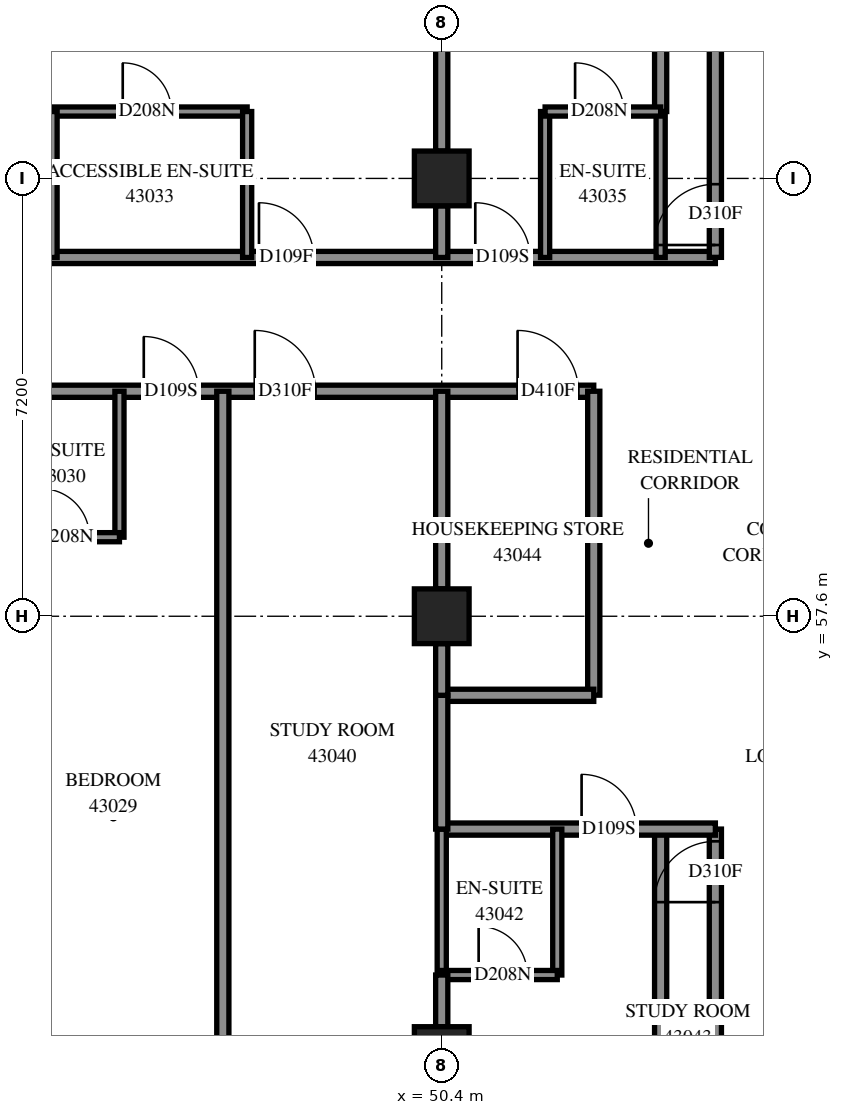
"""IFC4 building model, lengths in metres.
Left out: names, types, materials, properties, quantities, classifications, styles, units other than length and angle.
Written with IfcOpenShell. Run it as: python <this file> out.ifc"""

import sys

from ifc_helpers import new_model, si_unit, direction, frame, frame_2d, origin, origin_2d, place, context, subcontext, project, spatial, rectangle, extrude, element, fill, save


model = new_model("IFC4")
c1 = context("Model", 3, precision=1e-05, world=origin(), true_north=direction((0.0, 1.0)))
c2 = subcontext(c1, "Body", "Model", "MODEL_VIEW")
j1 = project(units=[si_unit("LENGTHUNIT", "METRE"), si_unit("PLANEANGLEUNIT", "RADIAN")], contexts=[c1])
p1 = place(None, origin())
s1 = spatial("IfcSite", under=j1, at=p1, CompositionType="ELEMENT")
p2 = place(p1, origin())
s2 = spatial("IfcBuilding", under=s1, at=p2, CompositionType="ELEMENT")
p3 = place(p2, frame((0.0, 0.0, 159.2)))
s3 = spatial("IfcBuildingStorey", under=s2, at=p3, CompositionType="ELEMENT", Elevation=159.2)
for number, where, z_axis, x_axis in (
    (1, (50.4, 50.4, 0.0), (0.0, 0.0, 1.0), (1.0, 0.0, 0.0)),
    (2, (50.4, 57.6, 0.0), (0.0, 0.0, 1.0), (1.0, 0.0, 0.0)),
    (3, (50.4, 64.8, 0.0), (0.0, 0.0, 1.0), (1.0, 0.0, 0.0)),
):
    element("IfcColumn", number, at=place(p3, frame(where, z_axis=z_axis, x_axis=x_axis)), inside=s3, PredefinedType="COLUMN", context=c2, shape_type="SweptSolid", body=[
        extrude(rectangle(XDim=0.9, YDim=0.9, at=origin_2d()), origin(), (0.0, 0.0, 1.0), 3.1),
    ])
p4 = place(p3, frame((36.0, 61.3, 0.0), z_axis=(0.0, 0.0, 1.0), x_axis=(1.0, 0.0, 0.0)))
e4 = element("IfcWall", 4, at=p4, inside=s3, PredefinedType="PARTITIONING", context=c2, shape_type="SweptSolid", body=[
    extrude(rectangle(XDim=16.9, YDim=0.2, at=frame_2d((8.45, 0.0))), origin(), (0.0, 0.0, 1.0), 3.1),
])
p5 = place(p4, frame((2.3, 0.0, 0.0)))
e5 = element("IfcOpeningElement", 5, at=p5, cuts=e4, PredefinedType="OPENING", context=c2, shape_type="SweptSolid", body=[
    extrude(rectangle(XDim=0.9, YDim=2.1, at=frame_2d((0.45, 1.05))), frame((0.0, 0.11, 0.0), z_axis=(0.0, -1.0, 0.0), x_axis=(1.0, 0.0, 0.0)), (0.0, 0.0, 1.0), 0.22),
])
p6 = place(p4, frame((4.125, 0.0, 0.0)))
e6 = element("IfcOpeningElement", 6, at=p6, cuts=e4, PredefinedType="OPENING", context=c2, shape_type="SweptSolid", body=[
    extrude(rectangle(XDim=1.0, YDim=2.1, at=frame_2d((0.5, 1.05))), frame((0.0, 0.11, 0.0), z_axis=(0.0, -1.0, 0.0), x_axis=(1.0, 0.0, 0.0)), (0.0, 0.0, 1.0), 0.22),
])
p7 = place(p4, frame((9.5, 0.0, 0.0)))
e7 = element("IfcOpeningElement", 7, at=p7, cuts=e4, PredefinedType="OPENING", context=c2, shape_type="SweptSolid", body=[
    extrude(rectangle(XDim=0.9, YDim=2.1, at=frame_2d((0.45, 1.05))), frame((0.0, 0.11, 0.0), z_axis=(0.0, -1.0, 0.0), x_axis=(1.0, 0.0, 0.0)), (0.0, 0.0, 1.0), 0.22),
])
p8 = place(p4, frame((11.325, 0.0, 0.0)))
e8 = element("IfcOpeningElement", 8, at=p8, cuts=e4, PredefinedType="OPENING", context=c2, shape_type="SweptSolid", body=[
    extrude(rectangle(XDim=1.0, YDim=2.1, at=frame_2d((0.5, 1.05))), frame((0.0, 0.11, 0.0), z_axis=(0.0, -1.0, 0.0), x_axis=(1.0, 0.0, 0.0)), (0.0, 0.0, 1.0), 0.22),
])
p9 = place(p4, frame((15.647, 0.0, 0.0)))
e9 = element("IfcOpeningElement", 9, at=p9, cuts=e4, PredefinedType="OPENING", context=c2, shape_type="SweptSolid", body=[
    extrude(rectangle(XDim=1.0, YDim=2.1, at=frame_2d((0.5, 1.05))), frame((0.0, 0.11, 0.0), z_axis=(0.0, -1.0, 0.0), x_axis=(1.0, 0.0, 0.0)), (0.0, 0.0, 1.0), 0.22),
])
p10 = place(p3, frame((40.702, 63.5, 0.0), z_axis=(0.0, 0.0, 1.0), x_axis=(1.0, 0.0, 0.0)))
e10 = element("IfcWall", 10, at=p10, inside=s3, PredefinedType="PARTITIONING", context=c2, shape_type="SweptSolid", body=[
    extrude(rectangle(XDim=14.198, YDim=0.2, at=frame_2d((7.099, 0.0))), origin(), (0.0, 0.0, 1.0), 3.1),
])
p11 = place(p10, frame((6.692, 0.0, 0.0)))
e11 = element("IfcOpeningElement", 11, at=p11, cuts=e10, PredefinedType="OPENING", context=c2, shape_type="SweptSolid", body=[
    extrude(rectangle(XDim=0.9, YDim=2.1, at=frame_2d((0.45, 1.05))), frame((0.0, 0.11, 0.0), z_axis=(0.0, -1.0, 0.0), x_axis=(1.0, 0.0, 0.0)), (0.0, 0.0, 1.0), 0.22),
])
p12 = place(p10, frame((10.25, 0.0, 0.0)))
e12 = element("IfcOpeningElement", 12, at=p12, cuts=e10, PredefinedType="OPENING", context=c2, shape_type="SweptSolid", body=[
    extrude(rectangle(XDim=0.9, YDim=2.1, at=frame_2d((0.45, 1.05))), frame((0.0, 0.11, 0.0), z_axis=(0.0, -1.0, 0.0), x_axis=(1.0, 0.0, 0.0)), (0.0, 0.0, 1.0), 0.22),
])
p13 = place(p3, frame((54.0, 42.297, 0.0), z_axis=(0.0, 0.0, 1.0), x_axis=(0.0, 1.0, 0.0)))
e13 = element("IfcWall", 13, at=p13, inside=s3, PredefinedType="PARTITIONING", context=c2, shape_type="SweptSolid", body=[
    extrude(rectangle(XDim=11.803, YDim=0.2, at=frame_2d((5.901, 0.0))), origin(), (0.0, 0.0, 1.0), 3.1),
])
p14 = place(p3, frame((46.8, 49.7, 0.0), z_axis=(0.0, 0.0, 1.0), x_axis=(0.0, 1.0, 0.0)))
e14 = element("IfcWall", 14, at=p14, inside=s3, PredefinedType="PARTITIONING", context=c2, shape_type="SweptSolid", body=[
    extrude(rectangle(XDim=11.6, YDim=0.2, at=frame_2d((5.8, 0.0))), origin(), (0.0, 0.0, 1.0), 3.1),
])
p15 = place(p3, frame((54.0, 65.9, 0.0), z_axis=(0.0, 0.0, 1.0), x_axis=(0.0, 1.0, 0.0)))
e15 = element("IfcWall", 15, at=p15, inside=s3, PredefinedType="PARTITIONING", context=c2, shape_type="SweptSolid", body=[
    extrude(rectangle(XDim=6.859, YDim=0.2, at=frame_2d((3.429, 0.0))), origin(), (0.0, 0.0, 1.0), 3.1),
])
p16 = place(p3, frame((54.9, 47.7, 0.0), z_axis=(0.0, 0.0, 1.0), x_axis=(0.0, 1.0, 0.0)))
e16 = element("IfcWall", 16, at=p16, inside=s3, PredefinedType="PARTITIONING", context=c2, shape_type="SweptSolid", body=[
    extrude(rectangle(XDim=6.4, YDim=0.2, at=frame_2d((3.2, 0.0))), origin(), (0.0, 0.0, 1.0), 3.1),
])
p17 = place(p16, frame((5.199, 0.0, 0.0)))
e17 = element("IfcOpeningElement", 17, at=p17, cuts=e16, PredefinedType="OPENING", context=c2, shape_type="SweptSolid", body=[
    extrude(rectangle(XDim=1.0, YDim=2.1, at=frame_2d((0.5, 1.05))), frame((0.0, 0.11, 0.0), z_axis=(0.0, -1.0, 0.0), x_axis=(1.0, 0.0, 0.0)), (0.0, 0.0, 1.0), 0.22),
])
p18 = place(p3, frame((50.4, 65.25, 0.0), z_axis=(0.0, 0.0, 1.0), x_axis=(0.0, 1.0, 0.0)))
e18 = element("IfcWall", 18, at=p18, inside=s3, PredefinedType="PARTITIONING", context=c2, shape_type="SweptSolid", body=[
    extrude(rectangle(XDim=6.3, YDim=0.2, at=frame_2d((3.15, 0.0))), origin(), (0.0, 0.0, 1.0), 3.1),
])
p19 = place(p3, frame((52.9, 56.302, 0.0), z_axis=(0.0, 0.0, 1.0), x_axis=(0.0, 1.0, 0.0)))
e19 = element("IfcWall", 19, at=p19, inside=s3, PredefinedType="PARTITIONING", context=c2, shape_type="SweptSolid", body=[
    extrude(rectangle(XDim=4.998, YDim=0.2, at=frame_2d((2.499, 0.0))), origin(), (0.0, 0.0, 1.0), 3.1),
])
p20 = place(p3, frame((50.4, 54.1, 0.0), z_axis=(0.0, 0.0, 1.0), x_axis=(1.0, 0.0, 0.0)))
e20 = element("IfcWall", 20, at=p20, inside=s3, PredefinedType="PARTITIONING", context=c2, shape_type="SweptSolid", body=[
    extrude(rectangle(XDim=4.5, YDim=0.2, at=frame_2d((2.25, 0.0))), origin(), (0.0, 0.0, 1.0), 3.1),
])
p21 = place(p20, frame((2.3, 0.0, 0.0)))
e21 = element("IfcOpeningElement", 21, at=p21, cuts=e20, PredefinedType="OPENING", context=c2, shape_type="SweptSolid", body=[
    extrude(rectangle(XDim=0.9, YDim=2.1, at=frame_2d((0.45, 1.05))), frame((0.0, 0.11, 0.0), z_axis=(0.0, -1.0, 0.0), x_axis=(1.0, 0.0, 0.0)), (0.0, 0.0, 1.0), 0.22),
])
p22 = place(p3, frame((54.9, 63.502, 0.0), z_axis=(0.0, 0.0, 1.0), x_axis=(0.0, 1.0, 0.0)))
e22 = element("IfcWall", 22, at=p22, inside=s3, PredefinedType="PARTITIONING", context=c2, shape_type="SweptSolid", body=[
    extrude(rectangle(XDim=3.998, YDim=0.2, at=frame_2d((1.999, 0.0))), origin(), (0.0, 0.0, 1.0), 3.1),
])
p23 = place(p22, frame((0.203, 0.0, 0.0)))
e23 = element("IfcOpeningElement", 23, at=p23, cuts=e22, PredefinedType="OPENING", context=c2, shape_type="SweptSolid", body=[
    extrude(rectangle(XDim=1.0, YDim=2.1, at=frame_2d((0.5, 1.05))), frame((0.0, 0.11, 0.0), z_axis=(0.0, -1.0, 0.0), x_axis=(1.0, 0.0, 0.0)), (0.0, 0.0, 1.0), 0.22),
])
p24 = place(p3, frame((50.4, 58.05, 0.0), z_axis=(0.0, 0.0, 1.0), x_axis=(0.0, 1.0, 0.0)))
e24 = element("IfcWall", 24, at=p24, inside=s3, PredefinedType="PARTITIONING", context=c2, shape_type="SweptSolid", body=[
    extrude(rectangle(XDim=3.25, YDim=0.2, at=frame_2d((1.625, 0.0))), origin(), (0.0, 0.0, 1.0), 3.1),
])
p25 = place(p3, frame((44.0, 65.9, 0.0), z_axis=(0.0, 0.0, 1.0), x_axis=(1.0, 0.0, 0.0)))
e25 = element("IfcWall", 25, at=p25, inside=s3, PredefinedType="PARTITIONING", context=c2, shape_type="SweptSolid", body=[
    extrude(rectangle(XDim=3.2, YDim=0.15, at=frame_2d((1.6, 0.0))), origin(), (0.0, 0.0, 1.0), 3.1),
])
p26 = place(p25, frame((1.154, 0.0, 0.0)))
e26 = element("IfcOpeningElement", 26, at=p26, cuts=e25, PredefinedType="OPENING", context=c2, shape_type="SweptSolid", body=[
    extrude(rectangle(XDim=0.8, YDim=2.1, at=frame_2d((0.4, 1.05))), frame((0.0, 0.085, 0.0), z_axis=(0.0, -1.0, 0.0), x_axis=(1.0, 0.0, 0.0)), (0.0, 0.0, 1.0), 0.17),
])
p27 = place(p3, frame((50.4, 56.3, 0.0), z_axis=(0.0, 0.0, 1.0), x_axis=(1.0, 0.0, 0.0)))
e27 = element("IfcWall", 27, at=p27, inside=s3, PredefinedType="PARTITIONING", context=c2, shape_type="SweptSolid", body=[
    extrude(rectangle(XDim=2.5, YDim=0.2, at=frame_2d((1.25, 0.0))), origin(), (0.0, 0.0, 1.0), 3.1),
])
for number, where, z_axis, x_axis in (
    (28, (44.0, 63.5, 0.0), (0.0, 0.0, 1.0), (0.0, 1.0, 0.0)),
    (29, (47.2, 63.5, 0.0), (0.0, 0.0, 1.0), (0.0, 1.0, 0.0)),
    (30, (52.1, 63.5, 0.0), (0.0, 0.0, 1.0), (0.0, 1.0, 0.0)),
    (31, (54.0, 63.5, 0.0), (0.0, 0.0, 1.0), (0.0, 1.0, 0.0)),
    (32, (45.1, 58.9, 0.0), (0.0, 0.0, 1.0), (0.0, 1.0, 0.0)),
    (33, (52.3, 51.7, 0.0), (0.0, 0.0, 1.0), (0.0, 1.0, 0.0)),
    (34, (50.4, 51.7, 0.0), (0.0, 0.0, 1.0), (0.0, 1.0, 0.0)),
):
    element("IfcWall", number, at=place(p3, frame(where, z_axis=z_axis, x_axis=x_axis)), inside=s3, PredefinedType="PARTITIONING", context=c2, shape_type="SweptSolid", body=[
        extrude(rectangle(XDim=2.4, YDim=0.15, at=frame_2d((1.2, 0.0))), origin(), (0.0, 0.0, 1.0), 3.1),
    ])
p28 = place(p3, frame((50.4, 54.1, 0.0), z_axis=(0.0, 0.0, 1.0), x_axis=(0.0, 1.0, 0.0)))
e35 = element("IfcWall", 35, at=p28, inside=s3, PredefinedType="PARTITIONING", context=c2, shape_type="SweptSolid", body=[
    extrude(rectangle(XDim=2.2, YDim=0.2, at=frame_2d((1.1, 0.0))), origin(), (0.0, 0.0, 1.0), 3.1),
])
p29 = place(p3, frame((43.2, 58.9, 0.0), z_axis=(0.0, 0.0, 1.0), x_axis=(1.0, 0.0, 0.0)))
e36 = element("IfcWall", 36, at=p29, inside=s3, PredefinedType="PARTITIONING", context=c2, shape_type="SweptSolid", body=[
    extrude(rectangle(XDim=1.9, YDim=0.15, at=frame_2d((0.95, 0.0))), origin(), (0.0, 0.0, 1.0), 3.1),
])
p30 = place(p29, frame((0.607, 0.0, 0.0)))
e37 = element("IfcOpeningElement", 37, at=p30, cuts=e36, PredefinedType="OPENING", context=c2, shape_type="SweptSolid", body=[
    extrude(rectangle(XDim=0.8, YDim=2.1, at=frame_2d((0.4, 1.05))), frame((0.0, 0.085, 0.0), z_axis=(0.0, -1.0, 0.0), x_axis=(1.0, 0.0, 0.0)), (0.0, 0.0, 1.0), 0.17),
])
p31 = place(p3, frame((52.1, 65.9, 0.0), z_axis=(0.0, 0.0, 1.0), x_axis=(1.0, 0.0, 0.0)))
e38 = element("IfcWall", 38, at=p31, inside=s3, PredefinedType="PARTITIONING", context=c2, shape_type="SweptSolid", body=[
    extrude(rectangle(XDim=1.9, YDim=0.15, at=frame_2d((0.95, 0.0))), origin(), (0.0, 0.0, 1.0), 3.1),
])
p32 = place(p31, frame((0.493, 0.0, 0.0)))
e39 = element("IfcOpeningElement", 39, at=p32, cuts=e38, PredefinedType="OPENING", context=c2, shape_type="SweptSolid", body=[
    extrude(rectangle(XDim=0.8, YDim=2.1, at=frame_2d((0.4, 1.05))), frame((0.0, 0.085, 0.0), z_axis=(0.0, -1.0, 0.0), x_axis=(1.0, 0.0, 0.0)), (0.0, 0.0, 1.0), 0.17),
])
p33 = place(p3, frame((50.4, 51.7, 0.0), z_axis=(0.0, 0.0, 1.0), x_axis=(1.0, 0.0, 0.0)))
e40 = element("IfcWall", 40, at=p33, inside=s3, PredefinedType="PARTITIONING", context=c2, shape_type="SweptSolid", body=[
    extrude(rectangle(XDim=1.9, YDim=0.15, at=frame_2d((0.95, 0.0))), origin(), (0.0, 0.0, 1.0), 3.1),
])
p34 = place(p33, frame((0.607, 0.0, 0.0)))
e41 = element("IfcOpeningElement", 41, at=p34, cuts=e40, PredefinedType="OPENING", context=c2, shape_type="SweptSolid", body=[
    extrude(rectangle(XDim=0.8, YDim=2.1, at=frame_2d((0.4, 1.05))), frame((0.0, 0.085, 0.0), z_axis=(0.0, -1.0, 0.0), x_axis=(1.0, 0.0, 0.0)), (0.0, 0.0, 1.0), 0.17),
])
for number, where, z_axis, x_axis in (
    (42, (50.4, 50.85, 0.0), (0.0, 0.0, 1.0), (0.0, 1.0, 0.0)),
    (43, (50.4, 56.3, 0.0), (0.0, 0.0, 1.0), (0.0, 1.0, 0.0)),
    (44, (50.4, 63.5, 0.0), (0.0, 0.0, 1.0), (0.0, 1.0, 0.0)),
):
    element("IfcWall", number, at=place(p3, frame(where, z_axis=z_axis, x_axis=x_axis)), inside=s3, PredefinedType="PARTITIONING", context=c2, shape_type="SweptSolid", body=[
        extrude(rectangle(XDim=0.85, YDim=0.2, at=frame_2d((0.425, 0.0))), origin(), (0.0, 0.0, 1.0), 3.1),
    ])
p35 = place(p7, origin())
e45 = element("IfcDoor", 45, at=p35, inside=s3, OperationType="SINGLE_SWING_LEFT", PredefinedType="DOOR", context=c2, shape_type="SweptSolid", body=[
    extrude(rectangle(XDim=0.9, YDim=2.1, at=frame_2d((0.45, 1.05))), frame((0.0, 0.025, 0.0), z_axis=(0.0, -1.0, 0.0), x_axis=(1.0, 0.0, 0.0)), (0.0, 0.0, 1.0), 0.05),
])
fill(e7, e45)
p36 = place(p30, origin())
e46 = element("IfcDoor", 46, at=p36, inside=s3, OperationType="SINGLE_SWING_RIGHT", PredefinedType="DOOR", context=c2, shape_type="SweptSolid", body=[
    extrude(rectangle(XDim=0.8, YDim=2.1, at=frame_2d((0.4, 1.05))), frame((0.0, 0.025, 0.0), z_axis=(0.0, -1.0, 0.0), x_axis=(1.0, 0.0, 0.0)), (0.0, 0.0, 1.0), 0.05),
])
fill(e37, e46)
p37 = place(p11, origin())
e47 = element("IfcDoor", 47, at=p37, inside=s3, OperationType="SINGLE_SWING_RIGHT", PredefinedType="DOOR", context=c2, shape_type="SweptSolid", body=[
    extrude(rectangle(XDim=0.9, YDim=2.1, at=frame_2d((0.45, 1.05))), frame((0.0, 0.025, 0.0), z_axis=(0.0, -1.0, 0.0), x_axis=(1.0, 0.0, 0.0)), (0.0, 0.0, 1.0), 0.05),
])
fill(e11, e47)
p38 = place(p26, origin())
e48 = element("IfcDoor", 48, at=p38, inside=s3, OperationType="SINGLE_SWING_RIGHT", PredefinedType="DOOR", context=c2, shape_type="SweptSolid", body=[
    extrude(rectangle(XDim=0.8, YDim=2.1, at=frame_2d((0.4, 1.05))), frame((0.0, 0.025, 0.0), z_axis=(0.0, -1.0, 0.0), x_axis=(1.0, 0.0, 0.0)), (0.0, 0.0, 1.0), 0.05),
])
fill(e26, e48)
p39 = place(p12, origin())
e49 = element("IfcDoor", 49, at=p39, inside=s3, OperationType="SINGLE_SWING_RIGHT", PredefinedType="DOOR", context=c2, shape_type="SweptSolid", body=[
    extrude(rectangle(XDim=0.9, YDim=2.1, at=frame_2d((0.45, 1.05))), frame((0.0, 0.025, 0.0), z_axis=(0.0, -1.0, 0.0), x_axis=(1.0, 0.0, 0.0)), (0.0, 0.0, 1.0), 0.05),
])
fill(e12, e49)
p40 = place(p32, origin())
e50 = element("IfcDoor", 50, at=p40, inside=s3, OperationType="SINGLE_SWING_RIGHT", PredefinedType="DOOR", context=c2, shape_type="SweptSolid", body=[
    extrude(rectangle(XDim=0.8, YDim=2.1, at=frame_2d((0.4, 1.05))), frame((0.0, 0.025, 0.0), z_axis=(0.0, -1.0, 0.0), x_axis=(1.0, 0.0, 0.0)), (0.0, 0.0, 1.0), 0.05),
])
fill(e39, e50)
p41 = place(p23, origin())
e51 = element("IfcDoor", 51, at=p41, inside=s3, OperationType="SINGLE_SWING_LEFT", PredefinedType="DOOR", context=c2, shape_type="SweptSolid", body=[
    extrude(rectangle(XDim=1.0, YDim=2.1, at=frame_2d((0.5, 1.05))), frame((0.0, 0.025, 0.0), z_axis=(0.0, -1.0, 0.0), x_axis=(1.0, 0.0, 0.0)), (0.0, 0.0, 1.0), 0.05),
])
fill(e23, e51)
p42 = place(p8, origin())
e52 = element("IfcDoor", 52, at=p42, inside=s3, OperationType="SINGLE_SWING_RIGHT", PredefinedType="DOOR", context=c2, shape_type="SweptSolid", body=[
    extrude(rectangle(XDim=1.0, YDim=2.1, at=frame_2d((0.5, 1.05))), frame((0.0, 0.025, 0.0), z_axis=(0.0, -1.0, 0.0), x_axis=(1.0, 0.0, 0.0)), (0.0, 0.0, 1.0), 0.05),
])
fill(e8, e52)
p43 = place(p21, origin())
e53 = element("IfcDoor", 53, at=p43, inside=s3, OperationType="SINGLE_SWING_LEFT", PredefinedType="DOOR", context=c2, shape_type="SweptSolid", body=[
    extrude(rectangle(XDim=0.9, YDim=2.1, at=frame_2d((0.45, 1.05))), frame((0.0, 0.025, 0.0), z_axis=(0.0, -1.0, 0.0), x_axis=(1.0, 0.0, 0.0)), (0.0, 0.0, 1.0), 0.05),
])
fill(e21, e53)
p44 = place(p34, origin())
e54 = element("IfcDoor", 54, at=p44, inside=s3, OperationType="SINGLE_SWING_RIGHT", PredefinedType="DOOR", context=c2, shape_type="SweptSolid", body=[
    extrude(rectangle(XDim=0.8, YDim=2.1, at=frame_2d((0.4, 1.05))), frame((0.0, 0.025, 0.0), z_axis=(0.0, -1.0, 0.0), x_axis=(1.0, 0.0, 0.0)), (0.0, 0.0, 1.0), 0.05),
])
fill(e41, e54)
p45 = place(p17, origin())
e55 = element("IfcDoor", 55, at=p45, inside=s3, OperationType="SINGLE_SWING_RIGHT", PredefinedType="DOOR", context=c2, shape_type="SweptSolid", body=[
    extrude(rectangle(XDim=1.0, YDim=2.1, at=frame_2d((0.5, 1.05))), frame((0.0, 0.025, 0.0), z_axis=(0.0, -1.0, 0.0), x_axis=(1.0, 0.0, 0.0)), (0.0, 0.0, 1.0), 0.05),
])
fill(e17, e55)
p46 = place(p9, origin())
e56 = element("IfcDoor", 56, at=p46, inside=s3, OperationType="SINGLE_SWING_LEFT", PredefinedType="DOOR", context=c2, shape_type="SweptSolid", body=[
    extrude(rectangle(XDim=1.0, YDim=2.1, at=frame_2d((0.5, 1.05))), frame((0.0, 0.025, 0.0), z_axis=(0.0, -1.0, 0.0), x_axis=(1.0, 0.0, 0.0)), (0.0, 0.0, 1.0), 0.05),
])
fill(e9, e56)
save(model, sys.argv[1])
